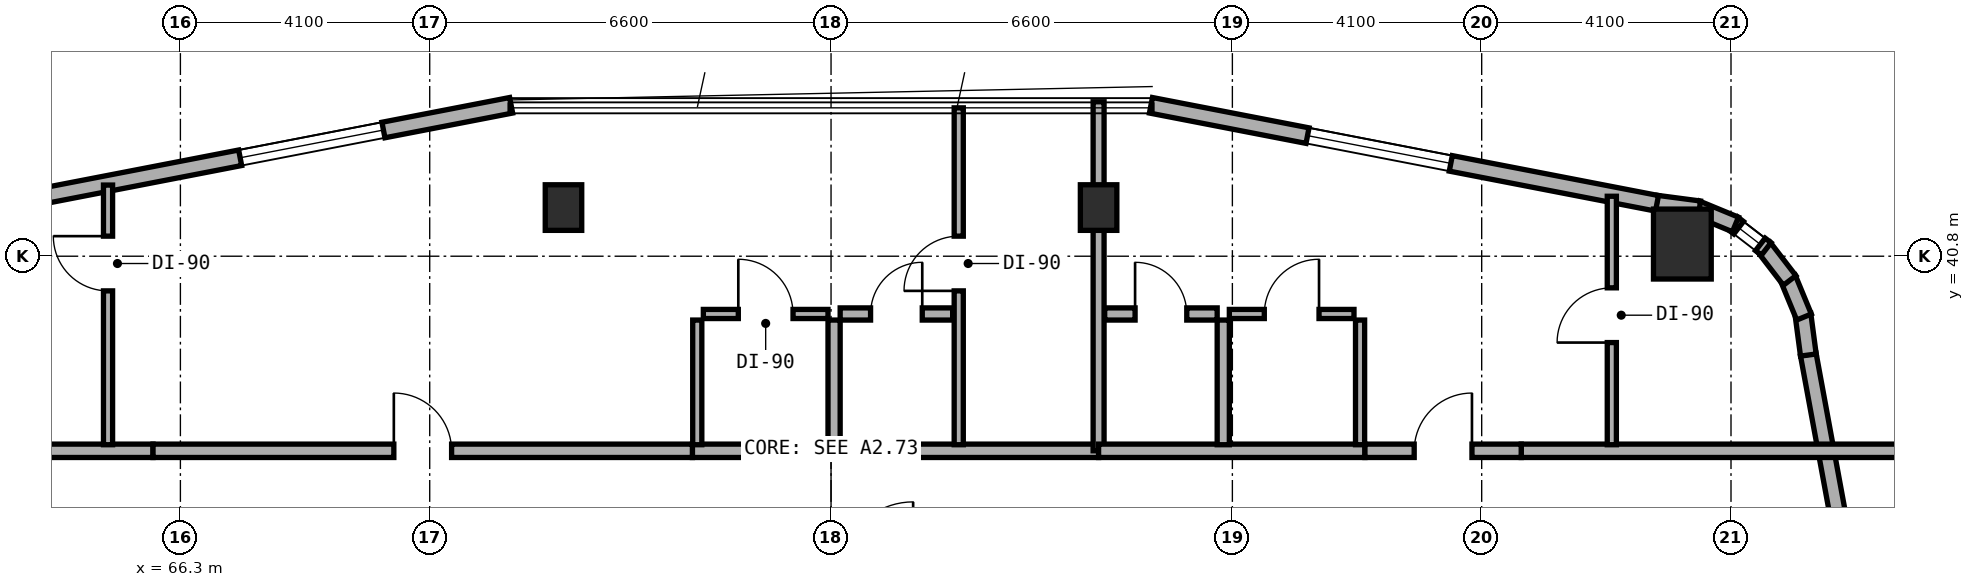
"""IFC4 building model, lengths in metres.
Left out: names, types, materials, properties, quantities, classifications, styles, units other than length and angle.
Written with IfcOpenShell. Run it as: python <this file> out.ifc"""

import sys

from ifc_helpers import new_model, si_unit, direction, frame, frame_2d, origin, origin_2d, place, context, subcontext, project, spatial, rectangle, extrude, element, fill, save


model = new_model("IFC4")
c1 = context("Model", 3, precision=1e-05, world=origin(), true_north=direction((0.0, 1.0)))
c2 = subcontext(c1, "Body", "Model", "MODEL_VIEW")
j1 = project(units=[si_unit("LENGTHUNIT", "METRE"), si_unit("PLANEANGLEUNIT", "RADIAN")], contexts=[c1])
p1 = place(None, origin())
s1 = spatial("IfcSite", under=j1, at=p1, CompositionType="ELEMENT")
p2 = place(p1, origin())
s2 = spatial("IfcBuilding", under=s1, at=p2, CompositionType="ELEMENT")
p3 = place(p2, frame((0.0, 0.0, 95.0)))
s3 = spatial("IfcBuildingStorey", under=s2, at=p3, CompositionType="ELEMENT", Elevation=95.0)
for number, where, z_axis, x_axis in (
    (1, (72.6, 41.6, 0.0), (0.0, 0.0, 1.0), (1.0, 0.0, 0.0)),
    (2, (81.4, 41.6, 0.0), (0.0, 0.0, 1.0), (1.0, 0.0, 0.0)),
):
    element("IfcColumn", number, at=place(p3, frame(where, z_axis=z_axis, x_axis=x_axis)), inside=s3, PredefinedType="COLUMN", context=c2, shape_type="SweptSolid", body=[
        extrude(rectangle(XDim=0.6, YDim=0.75, at=origin_2d()), origin(), (0.0, 0.0, 1.0), 3.5),
    ])
p4 = place(p3, frame((91.0, 41.0, 0.0), z_axis=(0.0, 0.0, 1.0), x_axis=(1.0, 0.0, 0.0)))
e3 = element("IfcColumn", 3, at=p4, inside=s3, PredefinedType="COLUMN", context=c2, shape_type="SweptSolid", body=[
    extrude(rectangle(XDim=0.95, YDim=1.15, at=origin_2d()), origin(), (0.0, 0.0, 1.0), 3.5),
])
p5 = place(p3, frame((94.682, 30.442, 0.0), z_axis=(0.0, 0.0, 1.0), x_axis=(-0.181209963057, 0.983444431215, 0.0)))
e4 = element("IfcWall", 4, at=p5, inside=s3, PredefinedType="STANDARD", context=c2, shape_type="SweptSolid", body=[
    extrude(rectangle(XDim=8.889, YDim=0.26, at=frame_2d((4.445, 0.0))), origin(), (0.0, 0.0, 1.0), 3.25),
])
p6 = place(p5, frame((2.276, 0.0, 0.8)))
e5 = element("IfcOpeningElement", 5, at=p6, cuts=e4, PredefinedType="OPENING", context=c2, shape_type="SweptSolid", body=[
    extrude(rectangle(XDim=2.4, YDim=1.6, at=frame_2d((1.2, 0.8))), frame((0.0, 0.14, 0.0), z_axis=(0.0, -1.0, 0.0), x_axis=(1.0, 0.0, 0.0)), (0.0, 0.0, 1.0), 0.28),
])
p7 = place(p3, frame((93.072, 39.175, 0.0), z_axis=(0.0, 0.0, 1.0), x_axis=(-0.131667498923, 0.991293937098, 0.0)))
e6 = element("IfcWall", 6, at=p7, inside=s3, PredefinedType="STANDARD", context=c2, shape_type="SweptSolid", body=[
    extrude(rectangle(XDim=0.677, YDim=0.26, at=frame_2d((0.338, 0.0))), origin(), (0.0, 0.0, 1.0), 3.25),
])
p8 = place(p3, frame((93.001, 39.8, 0.0), z_axis=(0.0, 0.0, 1.0), x_axis=(-0.381988976935, 0.924166879681, 0.0)))
e7 = element("IfcWall", 7, at=p8, inside=s3, PredefinedType="STANDARD", context=c2, shape_type="SweptSolid", body=[
    extrude(rectangle(XDim=0.693, YDim=0.26, at=frame_2d((0.347, 0.0))), origin(), (0.0, 0.0, 1.0), 3.25),
])
p9 = place(p3, frame((92.764, 40.401, 0.0), z_axis=(0.0, 0.0, 1.0), x_axis=(-0.609472651958, 0.792807092876, 0.0)))
e8 = element("IfcWall", 8, at=p9, inside=s3, PredefinedType="STANDARD", context=c2, shape_type="SweptSolid", body=[
    extrude(rectangle(XDim=0.694, YDim=0.26, at=frame_2d((0.347, 0.0))), origin(), (0.0, 0.0, 1.0), 3.25),
])
p10 = place(p3, frame((92.379, 40.92, 0.0), z_axis=(0.0, 0.0, 1.0), x_axis=(-0.792506234191, 0.609863811657, 0.0)))
e9 = element("IfcWall", 9, at=p10, inside=s3, PredefinedType="STANDARD", context=c2, shape_type="SweptSolid", body=[
    extrude(rectangle(XDim=0.694, YDim=0.26, at=frame_2d((0.347, 0.0))), origin(), (0.0, 0.0, 1.0), 3.25),
])
p11 = place(p10, frame((0.122, 0.0, 0.85)))
e10 = element("IfcOpeningElement", 10, at=p11, cuts=e9, PredefinedType="OPENING", context=c2, shape_type="SweptSolid", body=[
    extrude(rectangle(XDim=0.45, YDim=1.5, at=frame_2d((0.225, 0.75))), frame((0.0, 0.14, 0.0), z_axis=(0.0, -1.0, 0.0), x_axis=(1.0, 0.0, 0.0)), (0.0, 0.0, 1.0), 0.28),
])
p12 = place(p3, frame((91.873, 41.322, 0.0), z_axis=(0.0, 0.0, 1.0), x_axis=(-0.92421822618, 0.381864727877, 0.0)))
e11 = element("IfcWall", 11, at=p12, inside=s3, PredefinedType="STANDARD", context=c2, shape_type="SweptSolid", body=[
    extrude(rectangle(XDim=0.694, YDim=0.26, at=frame_2d((0.347, 0.0))), origin(), (0.0, 0.0, 1.0), 3.25),
])
p13 = place(p3, frame((91.281, 41.579, 0.0), z_axis=(0.0, 0.0, 1.0), x_axis=(-0.991433279471, 0.130614135366, 0.0)))
e12 = element("IfcWall", 12, at=p13, inside=s3, PredefinedType="STANDARD", context=c2, shape_type="SweptSolid", body=[
    extrude(rectangle(XDim=0.712, YDim=0.26, at=frame_2d((0.356, 0.0))), origin(), (0.0, 0.0, 1.0), 3.25),
])
p14 = place(p3, frame((90.583, 41.67, 0.0), z_axis=(0.0, 0.0, 1.0), x_axis=(-0.981750199588, 0.190175039396, 0.0)))
e13 = element("IfcWall", 13, at=p14, inside=s3, PredefinedType="STANDARD", context=c2, shape_type="SweptSolid", body=[
    extrude(rectangle(XDim=8.477, YDim=0.26, at=frame_2d((4.238, 0.0))), origin(), (0.0, 0.0, 1.0), 3.25),
])
p15 = place(p14, frame((3.454, 0.0, 0.8)))
e14 = element("IfcOpeningElement", 14, at=p15, cuts=e13, PredefinedType="OPENING", context=c2, shape_type="SweptSolid", body=[
    extrude(rectangle(XDim=2.4, YDim=1.6, at=frame_2d((1.2, 0.8))), frame((0.0, 0.14, 0.0), z_axis=(0.0, -1.0, 0.0), x_axis=(1.0, 0.0, 0.0)), (0.0, 0.0, 1.0), 0.28),
])
p16 = place(p3, frame((71.739, 43.282, 0.0), z_axis=(0.0, 0.0, 1.0), x_axis=(-0.981750199588, -0.190175039396, 0.0)))
e15 = element("IfcWall", 15, at=p16, inside=s3, PredefinedType="STANDARD", context=c2, shape_type="SweptSolid", body=[
    extrude(rectangle(XDim=8.477, YDim=0.26, at=frame_2d((4.238, 0.0))), origin(), (0.0, 0.0, 1.0), 3.25),
])
p17 = place(p16, frame((2.139, 0.0, 0.8)))
e16 = element("IfcOpeningElement", 16, at=p17, cuts=e15, PredefinedType="OPENING", context=c2, shape_type="SweptSolid", body=[
    extrude(rectangle(XDim=2.4, YDim=1.6, at=frame_2d((1.2, 0.8))), frame((0.0, 0.14, 0.0), z_axis=(0.0, -1.0, 0.0), x_axis=(1.0, 0.0, 0.0)), (0.0, 0.0, 1.0), 0.28),
])
p18 = place(p3, frame((59.36, 37.6, 0.0), z_axis=(0.0, 0.0, 1.0), x_axis=(1.0, 0.0, 0.0)))
e17 = element("IfcWall", 17, at=p18, inside=s3, PredefinedType="SOLIDWALL", context=c2, shape_type="SweptSolid", body=[
    extrude(rectangle(XDim=6.49, YDim=0.22, at=frame_2d((3.245, 0.0))), origin(), (0.0, 0.0, 1.0), 2.945),
])
p19 = place(p3, frame((74.72, 37.6, 0.0), z_axis=(0.0, 0.0, 1.0), x_axis=(1.0, 0.0, 0.0)))
e18 = element("IfcWall", 18, at=p19, inside=s3, PredefinedType="SOLIDWALL", context=c2, shape_type="SweptSolid", body=[
    extrude(rectangle(XDim=6.68, YDim=0.22, at=frame_2d((3.34, 0.0))), origin(), (0.0, 0.0, 1.0), 2.825),
])
p20 = place(p3, frame((65.85, 37.6, 0.0), z_axis=(0.0, 0.0, 1.0), x_axis=(1.0, 0.0, 0.0)))
e19 = element("IfcWall", 19, at=p20, inside=s3, PredefinedType="SOLIDWALL", context=c2, shape_type="SweptSolid", body=[
    extrude(rectangle(XDim=8.87, YDim=0.22, at=frame_2d((4.435, 0.0))), origin(), (0.0, 0.0, 1.0), 2.825),
])
p21 = place(p20, frame((3.96, 0.0, 0.0)))
e20 = element("IfcOpeningElement", 20, at=p21, cuts=e19, PredefinedType="OPENING", context=c2, shape_type="SweptSolid", body=[
    extrude(rectangle(XDim=0.95, YDim=2.1, at=frame_2d((0.475, 1.05))), frame((0.0, 0.12, 0.0), z_axis=(0.0, -1.0, 0.0), x_axis=(1.0, 0.0, 0.0)), (0.0, 0.0, 1.0), 0.24),
])
p22 = place(p3, frame((65.11, 37.7, 0.0), z_axis=(0.0, 0.0, 1.0), x_axis=(0.0, 1.0, 0.0)))
e21 = element("IfcWall", 21, at=p22, inside=s3, PredefinedType="PARTITIONING", context=c2, shape_type="SweptSolid", body=[
    extrude(rectangle(XDim=4.27, YDim=0.15, at=frame_2d((2.135, 0.0))), origin(), (0.0, 0.0, 1.0), 2.945),
])
p23 = place(p22, frame((2.53, 0.0, 0.0)))
e22 = element("IfcOpeningElement", 22, at=p23, cuts=e21, PredefinedType="OPENING", context=c2, shape_type="SweptSolid", body=[
    extrude(rectangle(XDim=0.9, YDim=2.1, at=frame_2d((0.45, 1.05))), frame((0.0, 0.085, 0.0), z_axis=(0.0, -1.0, 0.0), x_axis=(1.0, 0.0, 0.0)), (0.0, 0.0, 1.0), 0.17),
])
p24 = place(p3, frame((79.1, 37.7, 0.0), z_axis=(0.0, 0.0, 1.0), x_axis=(0.0, 1.0, 0.0)))
e23 = element("IfcWall", 23, at=p24, inside=s3, PredefinedType="PARTITIONING", context=c2, shape_type="SweptSolid", body=[
    extrude(rectangle(XDim=5.54, YDim=0.15, at=frame_2d((2.77, 0.0))), origin(), (0.0, 0.0, 1.0), 2.945),
])
p25 = place(p24, frame((2.53, 0.0, 0.0)))
e24 = element("IfcOpeningElement", 24, at=p25, cuts=e23, PredefinedType="OPENING", context=c2, shape_type="SweptSolid", body=[
    extrude(rectangle(XDim=0.9, YDim=2.1, at=frame_2d((0.45, 1.05))), frame((0.0, 0.085, 0.0), z_axis=(0.0, -1.0, 0.0), x_axis=(1.0, 0.0, 0.0)), (0.0, 0.0, 1.0), 0.17),
])
p26 = place(p3, frame((77.05, 37.7, 0.0), z_axis=(0.0, 0.0, 1.0), x_axis=(0.0, 1.0, 0.0)))
e25 = element("IfcWall", 25, at=p26, inside=s3, PredefinedType="PLUMBINGWALL", context=c2, shape_type="SweptSolid", body=[
    extrude(rectangle(XDim=2.05, YDim=0.2, at=frame_2d((1.025, 0.0))), origin(), (0.0, 0.0, 1.0), 2.955),
])
p27 = place(p3, frame((74.8, 37.7, 0.0), z_axis=(0.0, 0.0, 1.0), x_axis=(0.0, 1.0, 0.0)))
e26 = element("IfcWall", 26, at=p27, inside=s3, PredefinedType="PARTITIONING", context=c2, shape_type="SweptSolid", body=[
    extrude(rectangle(XDim=2.05, YDim=0.15, at=frame_2d((1.025, 0.0))), origin(), (0.0, 0.0, 1.0), 2.955),
])
p28 = place(p3, frame((77.15, 39.85, 0.0), z_axis=(0.0, 0.0, 1.0), x_axis=(1.0, 0.0, 0.0)))
e27 = element("IfcWall", 27, at=p28, inside=s3, PredefinedType="PLUMBINGWALL", context=c2, shape_type="SweptSolid", body=[
    extrude(rectangle(XDim=1.85, YDim=0.2, at=frame_2d((0.925, 0.0))), origin(), (0.0, 0.0, 1.0), 3.22),
])
p29 = place(p28, frame((0.5, 0.0, 0.0)))
e28 = element("IfcOpeningElement", 28, at=p29, cuts=e27, PredefinedType="OPENING", context=c2, shape_type="SweptSolid", body=[
    extrude(rectangle(XDim=0.85, YDim=2.1, at=frame_2d((0.425, 1.05))), frame((0.0, 0.11, 0.0), z_axis=(0.0, -1.0, 0.0), x_axis=(1.0, 0.0, 0.0)), (0.0, 0.0, 1.0), 0.22),
])
p30 = place(p3, frame((74.9, 39.85, 0.0), z_axis=(0.0, 0.0, 1.0), x_axis=(1.0, 0.0, 0.0)))
e29 = element("IfcWall", 29, at=p30, inside=s3, PredefinedType="PARTITIONING", context=c2, shape_type="SweptSolid", body=[
    extrude(rectangle(XDim=2.05, YDim=0.15, at=frame_2d((1.025, 0.0))), origin(), (0.0, 0.0, 1.0), 3.22),
])
p31 = place(p30, frame((0.575, 0.0, 0.0)))
e30 = element("IfcOpeningElement", 30, at=p31, cuts=e29, PredefinedType="OPENING", context=c2, shape_type="SweptSolid", body=[
    extrude(rectangle(XDim=0.9, YDim=2.1, at=frame_2d((0.45, 1.05))), frame((0.0, 0.085, 0.0), z_axis=(0.0, -1.0, 0.0), x_axis=(1.0, 0.0, 0.0)), (0.0, 0.0, 1.0), 0.17),
])
p32 = place(p3, frame((81.4, 37.6, 0.0), z_axis=(0.0, 0.0, 1.0), x_axis=(0.0, 1.0, 0.0)))
e31 = element("IfcWall", 31, at=p32, inside=s3, PredefinedType="SOLIDWALL", context=c2, shape_type="SweptSolid", body=[
    extrude(rectangle(XDim=5.74, YDim=0.18, at=frame_2d((2.87, 0.0))), origin(), (0.0, 0.0, 1.0), 2.825),
])
p33 = place(p3, frame((81.4, 37.6, 0.0), z_axis=(0.0, 0.0, 1.0), x_axis=(1.0, 0.0, 0.0)))
e32 = element("IfcWall", 32, at=p33, inside=s3, PredefinedType="SOLIDWALL", context=c2, shape_type="SweptSolid", body=[
    extrude(rectangle(XDim=4.38, YDim=0.22, at=frame_2d((2.19, 0.0))), origin(), (0.0, 0.0, 1.0), 2.825),
])
p34 = place(p3, frame((88.35, 37.6, 0.0), z_axis=(0.0, 0.0, 1.0), x_axis=(1.0, 0.0, 0.0)))
e33 = element("IfcWall", 33, at=p34, inside=s3, PredefinedType="SOLIDWALL", context=c2, shape_type="SweptSolid", body=[
    extrude(rectangle(XDim=6.29, YDim=0.22, at=frame_2d((3.145, 0.0))), origin(), (0.0, 0.0, 1.0), 2.945),
])
p35 = place(p3, frame((85.78, 37.6, 0.0), z_axis=(0.0, 0.0, 1.0), x_axis=(1.0, 0.0, 0.0)))
e34 = element("IfcWall", 34, at=p35, inside=s3, PredefinedType="SOLIDWALL", context=c2, shape_type="SweptSolid", body=[
    extrude(rectangle(XDim=2.57, YDim=0.22, at=frame_2d((1.285, 0.0))), origin(), (0.0, 0.0, 1.0), 3.22),
])
p36 = place(p35, frame((0.81, 0.0, 0.0)))
e35 = element("IfcOpeningElement", 35, at=p36, cuts=e34, PredefinedType="OPENING", context=c2, shape_type="SweptSolid", body=[
    extrude(rectangle(XDim=0.95, YDim=2.1, at=frame_2d((0.475, 1.05))), frame((0.0, 0.12, 0.0), z_axis=(0.0, -1.0, 0.0), x_axis=(1.0, 0.0, 0.0)), (0.0, 0.0, 1.0), 0.24),
])
p37 = place(p3, frame((89.84, 37.7, 0.0), z_axis=(0.0, 0.0, 1.0), x_axis=(0.0, 1.0, 0.0)))
e36 = element("IfcWall", 36, at=p37, inside=s3, PredefinedType="PARTITIONING", context=c2, shape_type="SweptSolid", body=[
    extrude(rectangle(XDim=4.086, YDim=0.15, at=frame_2d((2.043, 0.0))), origin(), (0.0, 0.0, 1.0), 2.945),
])
p38 = place(p37, frame((1.68, 0.0, 0.0)))
e37 = element("IfcOpeningElement", 37, at=p38, cuts=e36, PredefinedType="OPENING", context=c2, shape_type="SweptSolid", body=[
    extrude(rectangle(XDim=0.9, YDim=2.1, at=frame_2d((0.45, 1.05))), frame((0.0, 0.085, 0.0), z_axis=(0.0, -1.0, 0.0), x_axis=(1.0, 0.0, 0.0)), (0.0, 0.0, 1.0), 0.17),
])
p39 = place(p3, frame((83.45, 37.7, 0.0), z_axis=(0.0, 0.0, 1.0), x_axis=(0.0, 1.0, 0.0)))
e38 = element("IfcWall", 38, at=p39, inside=s3, PredefinedType="PLUMBINGWALL", context=c2, shape_type="SweptSolid", body=[
    extrude(rectangle(XDim=2.05, YDim=0.2, at=frame_2d((1.025, 0.0))), origin(), (0.0, 0.0, 1.0), 3.22),
])
p40 = place(p3, frame((85.7, 37.7, 0.0), z_axis=(0.0, 0.0, 1.0), x_axis=(0.0, 1.0, 0.0)))
e39 = element("IfcWall", 39, at=p40, inside=s3, PredefinedType="PARTITIONING", context=c2, shape_type="SweptSolid", body=[
    extrude(rectangle(XDim=2.05, YDim=0.15, at=frame_2d((1.025, 0.0))), origin(), (0.0, 0.0, 1.0), 3.22),
])
p41 = place(p3, frame((81.5, 39.85, 0.0), z_axis=(0.0, 0.0, 1.0), x_axis=(1.0, 0.0, 0.0)))
e40 = element("IfcWall", 40, at=p41, inside=s3, PredefinedType="PLUMBINGWALL", context=c2, shape_type="SweptSolid", body=[
    extrude(rectangle(XDim=1.85, YDim=0.2, at=frame_2d((0.925, 0.0))), origin(), (0.0, 0.0, 1.0), 2.825),
])
p42 = place(p41, frame((0.5, 0.0, 0.0)))
e41 = element("IfcOpeningElement", 41, at=p42, cuts=e40, PredefinedType="OPENING", context=c2, shape_type="SweptSolid", body=[
    extrude(rectangle(XDim=0.85, YDim=2.1, at=frame_2d((0.425, 1.05))), frame((0.0, 0.11, 0.0), z_axis=(0.0, -1.0, 0.0), x_axis=(1.0, 0.0, 0.0)), (0.0, 0.0, 1.0), 0.22),
])
p43 = place(p3, frame((83.55, 39.85, 0.0), z_axis=(0.0, 0.0, 1.0), x_axis=(1.0, 0.0, 0.0)))
e42 = element("IfcWall", 42, at=p43, inside=s3, PredefinedType="PARTITIONING", context=c2, shape_type="SweptSolid", body=[
    extrude(rectangle(XDim=2.05, YDim=0.15, at=frame_2d((1.025, 0.0))), origin(), (0.0, 0.0, 1.0), 3.22),
])
p44 = place(p43, frame((0.575, 0.0, 0.0)))
e43 = element("IfcOpeningElement", 43, at=p44, cuts=e42, PredefinedType="OPENING", context=c2, shape_type="SweptSolid", body=[
    extrude(rectangle(XDim=0.9, YDim=2.1, at=frame_2d((0.45, 1.05))), frame((0.0, 0.085, 0.0), z_axis=(0.0, -1.0, 0.0), x_axis=(1.0, 0.0, 0.0)), (0.0, 0.0, 1.0), 0.17),
])
p45 = place(p15, origin())
e44 = element("IfcWindow", 44, at=p45, inside=s3, PartitioningType="SINGLE_PANEL", PredefinedType="WINDOW", context=c2, shape_type="SweptSolid", body=[
    extrude(rectangle(XDim=2.4, YDim=1.6, at=frame_2d((1.2, 0.8))), frame((0.0, 0.03, 0.0), z_axis=(0.0, -1.0, 0.0), x_axis=(1.0, 0.0, 0.0)), (0.0, 0.0, 1.0), 0.06),
])
fill(e14, e44)
p46 = place(p17, origin())
e45 = element("IfcWindow", 45, at=p46, inside=s3, PartitioningType="SINGLE_PANEL", PredefinedType="WINDOW", context=c2, shape_type="SweptSolid", body=[
    extrude(rectangle(XDim=2.4, YDim=1.6, at=frame_2d((1.2, 0.8))), frame((0.0, 0.03, 0.0), z_axis=(0.0, -1.0, 0.0), x_axis=(1.0, 0.0, 0.0)), (0.0, 0.0, 1.0), 0.06),
])
fill(e16, e45)
p47 = place(p11, origin())
e46 = element("IfcWindow", 46, at=p47, inside=s3, PartitioningType="SINGLE_PANEL", PredefinedType="WINDOW", context=c2, shape_type="SweptSolid", body=[
    extrude(rectangle(XDim=0.45, YDim=1.5, at=frame_2d((0.225, 0.75))), frame((0.0, 0.03, 0.0), z_axis=(0.0, -1.0, 0.0), x_axis=(1.0, 0.0, 0.0)), (0.0, 0.0, 1.0), 0.06),
])
fill(e10, e46)
p48 = place(p21, origin())
e47 = element("IfcDoor", 47, at=p48, inside=s3, OperationType="SINGLE_SWING_LEFT", PredefinedType="DOOR", context=c2, shape_type="SweptSolid", body=[
    extrude(rectangle(XDim=0.95, YDim=2.1, at=frame_2d((0.475, 1.05))), frame((0.0, 0.025, 0.0), z_axis=(0.0, -1.0, 0.0), x_axis=(1.0, 0.0, 0.0)), (0.0, 0.0, 1.0), 0.05),
])
fill(e20, e47)
p49 = place(p23, origin())
e48 = element("IfcDoor", 48, at=p49, inside=s3, OperationType="SINGLE_SWING_RIGHT", PredefinedType="DOOR", context=c2, shape_type="SweptSolid", body=[
    extrude(rectangle(XDim=0.9, YDim=2.1, at=frame_2d((0.45, 1.05))), frame((0.0, 0.025, 0.0), z_axis=(0.0, -1.0, 0.0), x_axis=(1.0, 0.0, 0.0)), (0.0, 0.0, 1.0), 0.05),
])
fill(e22, e48)
p50 = place(p25, origin())
e49 = element("IfcDoor", 49, at=p50, inside=s3, OperationType="SINGLE_SWING_LEFT", PredefinedType="DOOR", context=c2, shape_type="SweptSolid", body=[
    extrude(rectangle(XDim=0.9, YDim=2.1, at=frame_2d((0.45, 1.05))), frame((0.0, 0.025, 0.0), z_axis=(0.0, -1.0, 0.0), x_axis=(1.0, 0.0, 0.0)), (0.0, 0.0, 1.0), 0.05),
])
fill(e24, e49)
p51 = place(p29, origin())
e50 = element("IfcDoor", 50, at=p51, inside=s3, OperationType="SINGLE_SWING_RIGHT", PredefinedType="DOOR", context=c2, shape_type="SweptSolid", body=[
    extrude(rectangle(XDim=0.85, YDim=2.1, at=frame_2d((0.425, 1.05))), frame((0.0, 0.025, 0.0), z_axis=(0.0, -1.0, 0.0), x_axis=(1.0, 0.0, 0.0)), (0.0, 0.0, 1.0), 0.05),
])
fill(e28, e50)
p52 = place(p31, origin())
e51 = element("IfcDoor", 51, at=p52, inside=s3, OperationType="SINGLE_SWING_LEFT", PredefinedType="DOOR", context=c2, shape_type="SweptSolid", body=[
    extrude(rectangle(XDim=0.9, YDim=2.1, at=frame_2d((0.45, 1.05))), frame((0.0, 0.025, 0.0), z_axis=(0.0, -1.0, 0.0), x_axis=(1.0, 0.0, 0.0)), (0.0, 0.0, 1.0), 0.05),
])
fill(e30, e51)
p53 = place(p36, origin())
e52 = element("IfcDoor", 52, at=p53, inside=s3, OperationType="SINGLE_SWING_RIGHT", PredefinedType="DOOR", context=c2, shape_type="SweptSolid", body=[
    extrude(rectangle(XDim=0.95, YDim=2.1, at=frame_2d((0.475, 1.05))), frame((0.0, 0.025, 0.0), z_axis=(0.0, -1.0, 0.0), x_axis=(1.0, 0.0, 0.0)), (0.0, 0.0, 1.0), 0.05),
])
fill(e35, e52)
p54 = place(p38, origin())
e53 = element("IfcDoor", 53, at=p54, inside=s3, OperationType="SINGLE_SWING_LEFT", PredefinedType="DOOR", context=c2, shape_type="SweptSolid", body=[
    extrude(rectangle(XDim=0.9, YDim=2.1, at=frame_2d((0.45, 1.05))), frame((0.0, 0.025, 0.0), z_axis=(0.0, -1.0, 0.0), x_axis=(1.0, 0.0, 0.0)), (0.0, 0.0, 1.0), 0.05),
])
fill(e37, e53)
p55 = place(p42, origin())
e54 = element("IfcDoor", 54, at=p55, inside=s3, OperationType="SINGLE_SWING_LEFT", PredefinedType="DOOR", context=c2, shape_type="SweptSolid", body=[
    extrude(rectangle(XDim=0.85, YDim=2.1, at=frame_2d((0.425, 1.05))), frame((0.0, 0.025, 0.0), z_axis=(0.0, -1.0, 0.0), x_axis=(1.0, 0.0, 0.0)), (0.0, 0.0, 1.0), 0.05),
])
fill(e41, e54)
p56 = place(p44, origin())
e55 = element("IfcDoor", 55, at=p56, inside=s3, OperationType="SINGLE_SWING_RIGHT", PredefinedType="DOOR", context=c2, shape_type="SweptSolid", body=[
    extrude(rectangle(XDim=0.9, YDim=2.1, at=frame_2d((0.45, 1.05))), frame((0.0, 0.025, 0.0), z_axis=(0.0, -1.0, 0.0), x_axis=(1.0, 0.0, 0.0)), (0.0, 0.0, 1.0), 0.05),
])
fill(e43, e55)
save(model, sys.argv[1])
